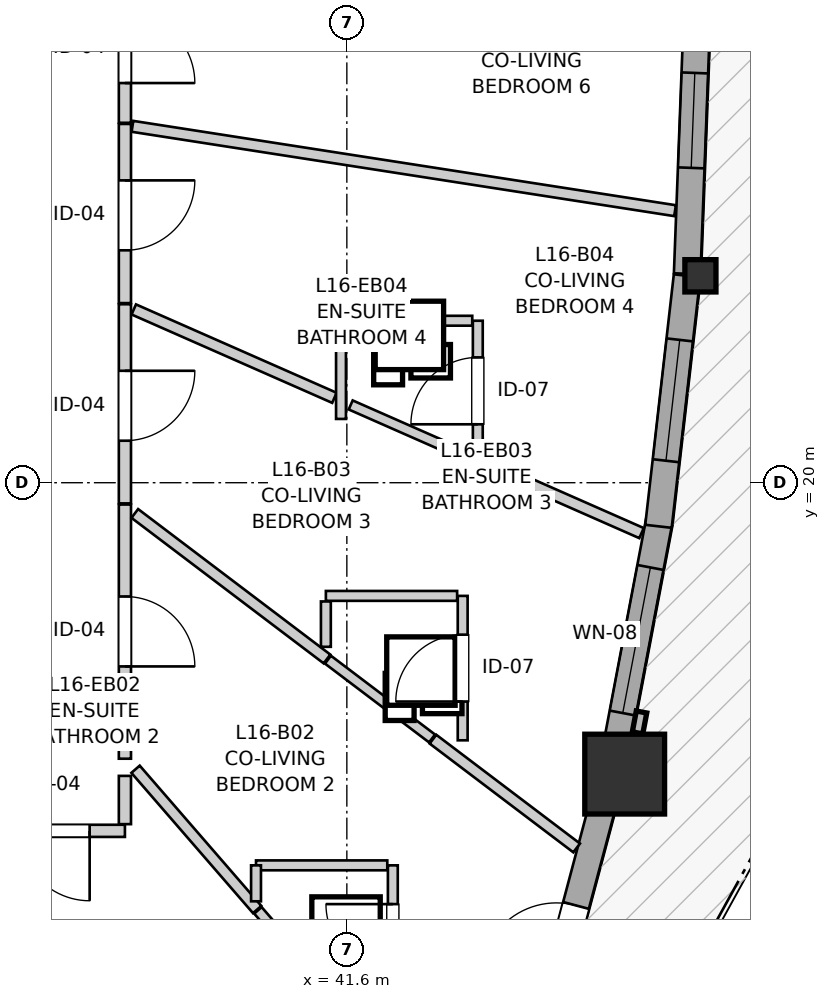
"""IFC4 building model, lengths in metres.
Left out: names, types, materials, properties, quantities, classifications, styles, units other than length and angle.
Written with IfcOpenShell. Run it as: python <this file> out.ifc"""

import sys

from ifc_helpers import new_model, si_unit, direction, frame, frame_2d, origin, origin_2d, place, context, subcontext, project, spatial, rectangle, i_section, extrude, source, transform, mapped, element, fill, save


model = new_model("IFC4")
c1 = context("Model", 3, precision=1e-05, world=origin(), true_north=direction((0.0, 1.0)))
c2 = subcontext(c1, "Body", "Model", "MODEL_VIEW")
j1 = project(units=[si_unit("LENGTHUNIT", "METRE"), si_unit("PLANEANGLEUNIT", "RADIAN")], contexts=[c1])
p1 = place(None, origin())
s1 = spatial("IfcSite", under=j1, at=p1, CompositionType="ELEMENT")
p2 = place(p1, origin())
s2 = spatial("IfcBuilding", under=s1, at=p2, CompositionType="ELEMENT")
p3 = place(p2, frame((0.0, 0.0, 55.8)))
s3 = spatial("IfcBuildingStorey", under=s2, at=p3, CompositionType="ELEMENT", Elevation=55.8)
m1 = source(origin(), c2, "Body", "SweptSolid", [
    extrude(rectangle(XDim=1.05, YDim=1.05, at=origin_2d()), origin(), (0.0, 0.0, 1.0), 2.94),
])
p4 = place(p3, frame((45.256, 16.166, 0.0), z_axis=(0.0, 0.0, 1.0), x_axis=(1.0, 0.0, 0.0)))
e1 = element("IfcColumn", 1, at=p4, inside=s3, PredefinedType="COLUMN", context=c2, shape_type="MappedRepresentation", body=[
    mapped(m1, transform((0.0, 0.0, 0.0), x_axis=(1.0, 0.0, 0.0), y_axis=(0.0, 1.0, 0.0), z_axis=(0.0, 0.0, 1.0), scale=1.0)),
])
m2 = source(origin(), c2, "Body", "SweptSolid", [
    extrude(i_section(OverallWidth=0.409, OverallDepth=0.425, WebThickness=0.03, FlangeThickness=0.048, FilletRadius=0.015, at=origin_2d()), origin(), (0.0, 0.0, 1.0), 2.94),
])
p5 = place(p3, frame((46.252, 22.722, 0.0), z_axis=(0.0, 0.0, 1.0), x_axis=(1.0, 0.0, 0.0)))
e2 = element("IfcColumn", 2, at=p5, inside=s3, PredefinedType="PILASTER", context=c2, shape_type="MappedRepresentation", body=[
    mapped(m2, transform((0.0, 0.0, 0.0), x_axis=(1.0, 0.0, 0.0), y_axis=(0.0, 1.0, 0.0), z_axis=(0.0, 0.0, 1.0), scale=1.0)),
])
p6 = place(p3, frame((44.205, 12.897, 0.0), z_axis=(0.0, 0.0, 1.0), x_axis=(0.257099428233, 0.966384956424, 0.0)))
e3 = element("IfcWall", 3, at=p6, inside=s3, PredefinedType="SOLIDWALL", context=c2, shape_type="SweptSolid", body=[
    extrude(rectangle(XDim=3.13, YDim=0.35, at=frame_2d((1.565, 0.0))), origin(), (0.0, 0.0, 1.0), 2.42),
])
p7 = place(p6, frame((0.595, 0.0, 0.0)))
e4 = element("IfcOpeningElement", 4, at=p7, cuts=e3, PredefinedType="OPENING", context=c2, shape_type="SweptSolid", body=[
    extrude(rectangle(XDim=1.0, YDim=2.1, at=frame_2d((0.5, 1.05))), frame((0.0, 0.185, 0.0), z_axis=(0.0, -1.0, 0.0), x_axis=(1.0, 0.0, 0.0)), (0.0, 0.0, 1.0), 0.37),
])
p8 = place(p3, frame((45.14, 16.494, 0.0), z_axis=(0.0, 0.0, 1.0), x_axis=(0.186608529586, 0.982434352354, 0.0)))
e5 = element("IfcWall", 5, at=p8, inside=s3, PredefinedType="SOLIDWALL", context=c2, shape_type="SweptSolid", body=[
    extrude(rectangle(XDim=3.074, YDim=0.35, at=frame_2d((1.537, 0.0))), origin(), (0.0, 0.0, 1.0), 2.42),
])
p9 = place(p8, frame((0.484, 0.0, 0.82)))
e6 = element("IfcOpeningElement", 6, at=p9, cuts=e5, PredefinedType="OPENING", context=c2, shape_type="SweptSolid", body=[
    extrude(rectangle(XDim=1.95, YDim=1.4, at=frame_2d((0.975, 0.7))), frame((0.0, 0.185, 0.0), z_axis=(0.0, -1.0, 0.0), x_axis=(1.0, 0.0, 0.0)), (0.0, 0.0, 1.0), 0.37),
])
p10 = place(p3, frame((45.7, 19.426, 0.0), z_axis=(0.0, 0.0, 1.0), x_axis=(0.113266370988, 0.993564657787, 0.0)))
e7 = element("IfcWall", 7, at=p10, inside=s3, PredefinedType="SOLIDWALL", context=c2, shape_type="SweptSolid", body=[
    extrude(rectangle(XDim=3.317, YDim=0.35, at=frame_2d((1.659, 0.0))), origin(), (0.0, 0.0, 1.0), 2.42),
])
p11 = place(p10, frame((0.869, 0.0, 0.82)))
e8 = element("IfcOpeningElement", 8, at=p11, cuts=e7, PredefinedType="OPENING", context=c2, shape_type="SweptSolid", body=[
    extrude(rectangle(XDim=1.6, YDim=1.35, at=frame_2d((0.8, 0.675))), frame((0.0, 0.185, 0.0), z_axis=(0.0, -1.0, 0.0), x_axis=(1.0, 0.0, 0.0)), (0.0, 0.0, 1.0), 0.37),
])
p12 = place(p3, frame((46.078, 22.749, 0.0), z_axis=(0.0, 0.0, 1.0), x_axis=(0.037972593677, 0.999278780986, 0.0)))
e9 = element("IfcWall", 9, at=p12, inside=s3, PredefinedType="SOLIDWALL", context=c2, shape_type="SweptSolid", body=[
    extrude(rectangle(XDim=3.298, YDim=0.35, at=frame_2d((1.649, 0.0))), origin(), (0.0, 0.0, 1.0), 2.42),
])
p13 = place(p12, frame((1.394, 0.0, 0.82)))
e10 = element("IfcOpeningElement", 10, at=p13, cuts=e9, PredefinedType="OPENING", context=c2, shape_type="SweptSolid", body=[
    extrude(rectangle(XDim=1.25, YDim=1.35, at=frame_2d((0.625, 0.675))), frame((0.0, 0.185, 0.0), z_axis=(0.0, -1.0, 0.0), x_axis=(1.0, 0.0, 0.0)), (0.0, 0.0, 1.0), 0.37),
])
p14 = place(p3, frame((38.68, 19.713, 0.0), z_axis=(0.0, 0.0, 1.0), x_axis=(0.0, -1.0, 0.0)))
e11 = element("IfcWall", 11, at=p14, inside=s3, PredefinedType="PARTITIONING", context=c2, shape_type="SweptSolid", body=[
    extrude(rectangle(XDim=3.344, YDim=0.16, at=frame_2d((1.672, 0.0))), origin(), (0.0, 0.0, 1.0), 2.94),
])
p15 = place(p14, frame((1.21, 0.0, 0.0)))
e12 = element("IfcOpeningElement", 12, at=p15, cuts=e11, PredefinedType="OPENING", context=c2, shape_type="SweptSolid", body=[
    extrude(rectangle(XDim=0.92, YDim=2.1, at=frame_2d((0.46, 1.05))), frame((0.0, 0.09, 0.0), z_axis=(0.0, -1.0, 0.0), x_axis=(1.0, 0.0, 0.0)), (0.0, 0.0, 1.0), 0.18),
])
p16 = place(p3, frame((38.68, 22.348, 0.0), z_axis=(0.0, 0.0, 1.0), x_axis=(0.0, -1.0, 0.0)))
e13 = element("IfcWall", 13, at=p16, inside=s3, PredefinedType="PARTITIONING", context=c2, shape_type="SweptSolid", body=[
    extrude(rectangle(XDim=2.62, YDim=0.16, at=frame_2d((1.31, 0.0))), origin(), (0.0, 0.0, 1.0), 2.94),
])
p17 = place(p16, frame((0.875, 0.0, 0.0)))
e14 = element("IfcOpeningElement", 14, at=p17, cuts=e13, PredefinedType="OPENING", context=c2, shape_type="SweptSolid", body=[
    extrude(rectangle(XDim=0.92, YDim=2.1, at=frame_2d((0.46, 1.05))), frame((0.0, 0.09, 0.0), z_axis=(0.0, -1.0, 0.0), x_axis=(1.0, 0.0, 0.0)), (0.0, 0.0, 1.0), 0.18),
])
p18 = place(p3, frame((38.68, 24.72, 0.0), z_axis=(0.0, 0.0, 1.0), x_axis=(0.0, -1.0, 0.0)))
e15 = element("IfcWall", 15, at=p18, inside=s3, PredefinedType="PARTITIONING", context=c2, shape_type="SweptSolid", body=[
    extrude(rectangle(XDim=2.357, YDim=0.16, at=frame_2d((1.178, 0.0))), origin(), (0.0, 0.0, 1.0), 2.94),
])
p19 = place(p18, frame((0.742, 0.0, 0.0)))
e16 = element("IfcOpeningElement", 16, at=p19, cuts=e15, PredefinedType="OPENING", context=c2, shape_type="SweptSolid", body=[
    extrude(rectangle(XDim=0.92, YDim=2.1, at=frame_2d((0.46, 1.05))), frame((0.0, 0.09, 0.0), z_axis=(0.0, -1.0, 0.0), x_axis=(1.0, 0.0, 0.0)), (0.0, 0.0, 1.0), 0.18),
])
p20 = place(p3, frame((38.68, 26.702, 0.0), z_axis=(0.0, 0.0, 1.0), x_axis=(0.0, -1.0, 0.0)))
e17 = element("IfcWall", 17, at=p20, inside=s3, PredefinedType="PARTITIONING", context=c2, shape_type="SweptSolid", body=[
    extrude(rectangle(XDim=1.967, YDim=0.16, at=frame_2d((0.983, 0.0))), origin(), (0.0, 0.0, 1.0), 2.94),
])
p21 = place(p20, frame((0.524, 0.0, 0.0)))
e18 = element("IfcOpeningElement", 18, at=p21, cuts=e17, PredefinedType="OPENING", context=c2, shape_type="SweptSolid", body=[
    extrude(rectangle(XDim=0.92, YDim=2.1, at=frame_2d((0.46, 1.05))), frame((0.0, 0.09, 0.0), z_axis=(0.0, -1.0, 0.0), x_axis=(1.0, 0.0, 0.0)), (0.0, 0.0, 1.0), 0.18),
])
p22 = place(p3, frame((42.205, 13.066, 0.0), z_axis=(0.0, 0.0, 1.0), x_axis=(0.0, 1.0, 0.0)))
e19 = element("IfcWall", 19, at=p22, inside=s3, PredefinedType="PARTITIONING", context=c2, shape_type="SweptSolid", body=[
    extrude(rectangle(XDim=1.9, YDim=0.13, at=frame_2d((0.95, 0.0))), origin(), (0.0, 0.0, 1.0), 2.94),
])
p23 = place(p22, frame((0.51, 0.0, 0.0)))
e20 = element("IfcOpeningElement", 20, at=p23, cuts=e19, PredefinedType="OPENING", context=c2, shape_type="SweptSolid", body=[
    extrude(rectangle(XDim=0.88, YDim=2.05, at=frame_2d((0.44, 1.025))), frame((0.0, 0.075, 0.0), z_axis=(0.0, -1.0, 0.0), x_axis=(1.0, 0.0, 0.0)), (0.0, 0.0, 1.0), 0.15),
])
p24 = place(p3, frame((43.124, 16.611, 0.0), z_axis=(0.0, 0.0, 1.0), x_axis=(0.0, 1.0, 0.0)))
e21 = element("IfcWall", 21, at=p24, inside=s3, PredefinedType="PARTITIONING", context=c2, shape_type="SweptSolid", body=[
    extrude(rectangle(XDim=1.9, YDim=0.13, at=frame_2d((0.95, 0.0))), origin(), (0.0, 0.0, 1.0), 2.94),
])
p25 = place(p24, frame((0.51, 0.0, 0.0)))
e22 = element("IfcOpeningElement", 22, at=p25, cuts=e21, PredefinedType="OPENING", context=c2, shape_type="SweptSolid", body=[
    extrude(rectangle(XDim=0.88, YDim=2.05, at=frame_2d((0.44, 1.025))), frame((0.0, 0.075, 0.0), z_axis=(0.0, -1.0, 0.0), x_axis=(1.0, 0.0, 0.0)), (0.0, 0.0, 1.0), 0.15),
])
p26 = place(p3, frame((43.323, 20.286, 0.0), z_axis=(0.0, 0.0, 1.0), x_axis=(0.0, 1.0, 0.0)))
e23 = element("IfcWall", 23, at=p26, inside=s3, PredefinedType="PARTITIONING", context=c2, shape_type="SweptSolid", body=[
    extrude(rectangle(XDim=1.845, YDim=0.13, at=frame_2d((0.923, 0.0))), origin(), (0.0, 0.0, 1.0), 2.94),
])
p27 = place(p26, frame((0.482, 0.0, 0.0)))
e24 = element("IfcOpeningElement", 24, at=p27, cuts=e23, PredefinedType="OPENING", context=c2, shape_type="SweptSolid", body=[
    extrude(rectangle(XDim=0.88, YDim=2.05, at=frame_2d((0.44, 1.025))), frame((0.0, 0.075, 0.0), z_axis=(0.0, -1.0, 0.0), x_axis=(1.0, 0.0, 0.0)), (0.0, 0.0, 1.0), 0.15),
])
p28 = place(p3, frame((38.68, 15.42, 0.0), z_axis=(0.0, 0.0, 1.0), x_axis=(-1.0, 0.0, 0.0)))
e25 = element("IfcWall", 25, at=p28, inside=s3, PredefinedType="PARTITIONING", context=c2, shape_type="SweptSolid", body=[
    extrude(rectangle(XDim=1.816, YDim=0.16, at=frame_2d((0.908, 0.0))), origin(), (0.0, 0.0, 1.0), 2.94),
])
p29 = place(p28, frame((0.464, 0.0, 0.0)))
e26 = element("IfcOpeningElement", 26, at=p29, cuts=e25, PredefinedType="OPENING", context=c2, shape_type="SweptSolid", body=[
    extrude(rectangle(XDim=0.92, YDim=2.1, at=frame_2d((0.46, 1.05))), frame((0.0, 0.09, 0.0), z_axis=(0.0, -1.0, 0.0), x_axis=(1.0, 0.0, 0.0)), (0.0, 0.0, 1.0), 0.18),
])
p30 = place(p3, frame((36.908, 15.295, 0.0), z_axis=(0.0, 0.0, 1.0), x_axis=(0.522407183079, -0.852696156358, 0.0)))
e27 = element("IfcWall", 27, at=p30, inside=s3, PredefinedType="PARTITIONING", context=c2, shape_type="SweptSolid", body=[
    extrude(rectangle(XDim=9.87, YDim=0.145, at=frame_2d((4.935, 0.0))), origin(), (0.0, 0.0, 1.0), 2.94),
])
p31 = place(p3, frame((38.779, 24.689, 0.0), z_axis=(0.0, 0.0, 1.0), x_axis=(0.988134938683, -0.153588225311, 0.0)))
e28 = element("IfcWall", 28, at=p31, inside=s3, PredefinedType="PARTITIONING", context=c2, shape_type="SweptSolid", body=[
    extrude(rectangle(XDim=7.225, YDim=0.145, at=frame_2d((3.612, 0.0))), origin(), (0.0, 0.0, 1.0), 2.94),
])
p32 = place(p3, frame((38.81, 19.595, 0.0), z_axis=(0.0, 0.0, 1.0), x_axis=(0.797304275437, -0.603577577756, 0.0)))
e29 = element("IfcWall", 29, at=p32, inside=s3, PredefinedType="PARTITIONING", context=c2, shape_type="SweptSolid", body=[
    extrude(rectangle(XDim=3.172, YDim=0.145, at=frame_2d((1.586, 0.0))), origin(), (0.0, 0.0, 1.0), 2.94),
])
p33 = place(p3, frame((38.796, 22.28, 0.0), z_axis=(0.0, 0.0, 1.0), x_axis=(0.9151327572, -0.403152622092, 0.0)))
e30 = element("IfcWall", 30, at=p33, inside=s3, PredefinedType="PARTITIONING", context=c2, shape_type="SweptSolid", body=[
    extrude(rectangle(XDim=2.885, YDim=0.145, at=frame_2d((1.442, 0.0))), origin(), (0.0, 0.0, 1.0), 2.94),
])
p34 = place(p3, frame((38.82, 16.23, 0.0), z_axis=(0.0, 0.0, 1.0), x_axis=(0.655037088123, -0.755596726556, 0.0)))
e31 = element("IfcWall", 31, at=p34, inside=s3, PredefinedType="PARTITIONING", context=c2, shape_type="SweptSolid", body=[
    extrude(rectangle(XDim=2.442, YDim=0.145, at=frame_2d((1.221, 0.0))), origin(), (0.0, 0.0, 1.0), 2.94),
])
p35 = place(p3, frame((43.41, 20.248, 0.0), z_axis=(0.0, 0.0, 1.0), x_axis=(0.915032786041, -0.403379474527, 0.0)))
e32 = element("IfcWall", 32, at=p35, inside=s3, PredefinedType="PARTITIONING", context=c2, shape_type="SweptSolid", body=[
    extrude(rectangle(XDim=2.259, YDim=0.145, at=frame_2d((1.13, 0.0))), origin(), (0.0, 0.0, 1.0), 2.94),
])
p36 = place(p3, frame((42.733, 16.626, 0.0), z_axis=(0.0, 0.0, 1.0), x_axis=(0.797372907097, -0.603486907089, 0.0)))
e33 = element("IfcWall", 33, at=p36, inside=s3, PredefinedType="PARTITIONING", context=c2, shape_type="SweptSolid", body=[
    extrude(rectangle(XDim=2.371, YDim=0.145, at=frame_2d((1.186, 0.0))), origin(), (0.0, 0.0, 1.0), 2.94),
])
p37 = place(p3, frame((41.65, 21.023, 0.0), z_axis=(0.0, 0.0, 1.0), x_axis=(0.915165742406, -0.403077739309, 0.0)))
e34 = element("IfcWall", 34, at=p37, inside=s3, PredefinedType="PARTITIONING", context=c2, shape_type="SweptSolid", body=[
    extrude(rectangle(XDim=1.689, YDim=0.13, at=frame_2d((0.844, 0.0))), origin(), (0.0, 0.0, 1.0), 2.94),
])
for number, where, z_axis, x_axis in (
    (35, (41.324, 18.511, 0.0), (0.0, 0.0, 1.0), (1.0, 0.0, 0.0)),
    (36, (40.405, 14.966, 0.0), (0.0, 0.0, 1.0), (1.0, 0.0, 0.0)),
):
    element("IfcWall", number, at=place(p3, frame(where, z_axis=z_axis, x_axis=x_axis)), inside=s3, PredefinedType="PARTITIONING", context=c2, shape_type="SweptSolid", body=[
        extrude(rectangle(XDim=1.727, YDim=0.13, at=frame_2d((0.864, 0.0))), origin(), (0.0, 0.0, 1.0), 2.94),
    ])
p38 = place(p3, frame((41.596, 22.131, 0.0), z_axis=(0.0, 0.0, 1.0), x_axis=(1.0, 0.0, 0.0)))
e37 = element("IfcWall", 37, at=p38, inside=s3, PredefinedType="PARTITIONING", context=c2, shape_type="SweptSolid", body=[
    extrude(rectangle(XDim=1.654, YDim=0.13, at=frame_2d((0.827, 0.0))), origin(), (0.0, 0.0, 1.0), 2.94),
])
p39 = place(p3, frame((40.43, 14.374, 0.0), z_axis=(0.0, 0.0, 1.0), x_axis=(0.655121637619, -0.755523421162, 0.0)))
e38 = element("IfcWall", 38, at=p39, inside=s3, PredefinedType="PARTITIONING", context=c2, shape_type="SweptSolid", body=[
    extrude(rectangle(XDim=1.751, YDim=0.13, at=frame_2d((0.875, 0.0))), origin(), (0.0, 0.0, 1.0), 2.94),
])
p40 = place(p3, frame((41.351, 17.672, 0.0), z_axis=(0.0, 0.0, 1.0), x_axis=(0.797400841938, -0.603449995672, 0.0)))
e39 = element("IfcWall", 39, at=p40, inside=s3, PredefinedType="PARTITIONING", context=c2, shape_type="SweptSolid", body=[
    extrude(rectangle(XDim=1.718, YDim=0.13, at=frame_2d((0.859, 0.0))), origin(), (0.0, 0.0, 1.0), 2.94),
])
p41 = place(p3, frame((41.523, 20.839, 0.0), z_axis=(0.0, 0.0, 1.0), x_axis=(0.0, 1.0, 0.0)))
e40 = element("IfcWall", 40, at=p41, inside=s3, PredefinedType="PARTITIONING", context=c2, shape_type="SweptSolid", body=[
    extrude(rectangle(XDim=1.532, YDim=0.13, at=frame_2d((0.766, 0.0))), origin(), (0.0, 0.0, 1.0), 2.94),
])
p42 = place(p3, frame((38.68, 15.508, 0.0), z_axis=(0.0, 0.0, 1.0), x_axis=(0.0, 1.0, 0.0)))
e41 = element("IfcWall", 41, at=p42, inside=s3, PredefinedType="PARTITIONING", context=c2, shape_type="SweptSolid", body=[
    extrude(rectangle(XDim=0.635, YDim=0.16, at=frame_2d((0.317, 0.0))), origin(), (0.0, 0.0, 1.0), 2.94),
])
p43 = place(p3, frame((41.324, 17.841, 0.0), z_axis=(0.0, 0.0, 1.0), x_axis=(0.0, 1.0, 0.0)))
e42 = element("IfcWall", 42, at=p43, inside=s3, PredefinedType="PARTITIONING", context=c2, shape_type="SweptSolid", body=[
    extrude(rectangle(XDim=0.597, YDim=0.13, at=frame_2d((0.298, 0.0))), origin(), (0.0, 0.0, 1.0), 2.94),
])
p44 = place(p3, frame((40.405, 14.493, 0.0), z_axis=(0.0, 0.0, 1.0), x_axis=(0.0, 1.0, 0.0)))
e43 = element("IfcWall", 43, at=p44, inside=s3, PredefinedType="PARTITIONING", context=c2, shape_type="SweptSolid", body=[
    extrude(rectangle(XDim=0.473, YDim=0.13, at=frame_2d((0.237, 0.0))), origin(), (0.0, 0.0, 1.0), 2.94),
])
m3 = source(origin(), c2, "Body", "SweptSolid", [
    extrude(rectangle(XDim=1.95, YDim=1.4, at=frame_2d((0.975, 0.7))), frame((0.0, 0.03, 0.0), z_axis=(0.0, -1.0, 0.0), x_axis=(1.0, 0.0, 0.0)), (0.0, 0.0, 1.0), 0.06),
])
p45 = place(p9, origin())
e44 = element("IfcWindow", 44, at=p45, inside=s3, PartitioningType="SINGLE_PANEL", PredefinedType="WINDOW", context=c2, shape_type="MappedRepresentation", body=[
    mapped(m3, transform((0.0, 0.0, 0.0), x_axis=(1.0, 0.0, 0.0), y_axis=(0.0, 1.0, 0.0), z_axis=(0.0, 0.0, 1.0), scale=1.0)),
])
fill(e6, e44)
m4 = source(origin(), c2, "Body", "SweptSolid", [
    extrude(rectangle(XDim=1.6, YDim=1.35, at=frame_2d((0.8, 0.675))), frame((0.0, 0.03, 0.0), z_axis=(0.0, -1.0, 0.0), x_axis=(1.0, 0.0, 0.0)), (0.0, 0.0, 1.0), 0.06),
])
p46 = place(p11, origin())
e45 = element("IfcWindow", 45, at=p46, inside=s3, PartitioningType="SINGLE_PANEL", PredefinedType="WINDOW", context=c2, shape_type="MappedRepresentation", body=[
    mapped(m4, transform((0.0, 0.0, 0.0), x_axis=(1.0, 0.0, 0.0), y_axis=(0.0, 1.0, 0.0), z_axis=(0.0, 0.0, 1.0), scale=1.0)),
])
fill(e8, e45)
m5 = source(origin(), c2, "Body", "SweptSolid", [
    extrude(rectangle(XDim=1.25, YDim=1.35, at=frame_2d((0.625, 0.675))), frame((0.0, 0.03, 0.0), z_axis=(0.0, -1.0, 0.0), x_axis=(1.0, 0.0, 0.0)), (0.0, 0.0, 1.0), 0.06),
])
p47 = place(p13, origin())
e46 = element("IfcWindow", 46, at=p47, inside=s3, PartitioningType="SINGLE_PANEL", PredefinedType="WINDOW", context=c2, shape_type="MappedRepresentation", body=[
    mapped(m5, transform((0.0, 0.0, 0.0), x_axis=(1.0, 0.0, 0.0), y_axis=(0.0, 1.0, 0.0), z_axis=(0.0, 0.0, 1.0), scale=1.0)),
])
fill(e10, e46)
m6 = source(origin(), c2, "Body", "SweptSolid", [
    extrude(rectangle(XDim=1.0, YDim=2.1, at=frame_2d((0.5, 1.05))), frame((0.0, 0.025, 0.0), z_axis=(0.0, -1.0, 0.0), x_axis=(1.0, 0.0, 0.0)), (0.0, 0.0, 1.0), 0.05),
])
p48 = place(p7, origin())
e47 = element("IfcDoor", 47, at=p48, inside=s3, OperationType="SINGLE_SWING_LEFT", PredefinedType="DOOR", context=c2, shape_type="MappedRepresentation", body=[
    mapped(m6, transform((0.0, 0.0, 0.0), x_axis=(1.0, 0.0, 0.0), y_axis=(0.0, 1.0, 0.0), z_axis=(0.0, 0.0, 1.0), scale=1.0)),
])
fill(e4, e47)
m7 = source(origin(), c2, "Body", "SweptSolid", [
    extrude(rectangle(XDim=0.92, YDim=2.1, at=frame_2d((0.46, 1.05))), frame((0.0, 0.025, 0.0), z_axis=(0.0, -1.0, 0.0), x_axis=(1.0, 0.0, 0.0)), (0.0, 0.0, 1.0), 0.05),
])
p49 = place(p15, origin())
e48 = element("IfcDoor", 48, at=p49, inside=s3, OperationType="SINGLE_SWING_RIGHT", PredefinedType="DOOR", context=c2, shape_type="MappedRepresentation", body=[
    mapped(m7, transform((0.0, 0.0, 0.0), x_axis=(1.0, 0.0, 0.0), y_axis=(0.0, 1.0, 0.0), z_axis=(0.0, 0.0, 1.0), scale=1.0)),
])
fill(e12, e48)
p50 = place(p17, origin())
e49 = element("IfcDoor", 49, at=p50, inside=s3, OperationType="SINGLE_SWING_LEFT", PredefinedType="DOOR", context=c2, shape_type="MappedRepresentation", body=[
    mapped(m7, transform((0.0, 0.0, 0.0), x_axis=(1.0, 0.0, 0.0), y_axis=(0.0, 1.0, 0.0), z_axis=(0.0, 0.0, 1.0), scale=1.0)),
])
fill(e14, e49)
p51 = place(p19, origin())
e50 = element("IfcDoor", 50, at=p51, inside=s3, OperationType="SINGLE_SWING_LEFT", PredefinedType="DOOR", context=c2, shape_type="MappedRepresentation", body=[
    mapped(m7, transform((0.0, 0.0, 0.0), x_axis=(1.0, 0.0, 0.0), y_axis=(0.0, 1.0, 0.0), z_axis=(0.0, 0.0, 1.0), scale=1.0)),
])
fill(e16, e50)
p52 = place(p21, origin())
e51 = element("IfcDoor", 51, at=p52, inside=s3, OperationType="SINGLE_SWING_RIGHT", PredefinedType="DOOR", context=c2, shape_type="MappedRepresentation", body=[
    mapped(m7, transform((0.0, 0.0, 0.0), x_axis=(1.0, 0.0, 0.0), y_axis=(0.0, 1.0, 0.0), z_axis=(0.0, 0.0, 1.0), scale=1.0)),
])
fill(e18, e51)
m8 = source(origin(), c2, "Body", "SweptSolid", [
    extrude(rectangle(XDim=0.88, YDim=2.05, at=frame_2d((0.44, 1.025))), frame((0.0, 0.025, 0.0), z_axis=(0.0, -1.0, 0.0), x_axis=(1.0, 0.0, 0.0)), (0.0, 0.0, 1.0), 0.05),
])
p53 = place(p23, origin())
e52 = element("IfcDoor", 52, at=p53, inside=s3, OperationType="SINGLE_SWING_RIGHT", PredefinedType="DOOR", context=c2, shape_type="MappedRepresentation", body=[
    mapped(m8, transform((0.0, 0.0, 0.0), x_axis=(1.0, 0.0, 0.0), y_axis=(0.0, 1.0, 0.0), z_axis=(0.0, 0.0, 1.0), scale=1.0)),
])
fill(e20, e52)
p54 = place(p25, origin())
e53 = element("IfcDoor", 53, at=p54, inside=s3, OperationType="SINGLE_SWING_LEFT", PredefinedType="DOOR", context=c2, shape_type="MappedRepresentation", body=[
    mapped(m8, transform((0.0, 0.0, 0.0), x_axis=(1.0, 0.0, 0.0), y_axis=(0.0, 1.0, 0.0), z_axis=(0.0, 0.0, 1.0), scale=1.0)),
])
fill(e22, e53)
p55 = place(p27, origin())
e54 = element("IfcDoor", 54, at=p55, inside=s3, OperationType="SINGLE_SWING_LEFT", PredefinedType="DOOR", context=c2, shape_type="MappedRepresentation", body=[
    mapped(m8, transform((0.0, 0.0, 0.0), x_axis=(1.0, 0.0, 0.0), y_axis=(0.0, 1.0, 0.0), z_axis=(0.0, 0.0, 1.0), scale=1.0)),
])
fill(e24, e54)
p56 = place(p29, origin())
e55 = element("IfcDoor", 55, at=p56, inside=s3, OperationType="SINGLE_SWING_LEFT", PredefinedType="DOOR", context=c2, shape_type="MappedRepresentation", body=[
    mapped(m7, transform((0.0, 0.0, 0.0), x_axis=(1.0, 0.0, 0.0), y_axis=(0.0, 1.0, 0.0), z_axis=(0.0, 0.0, 1.0), scale=1.0)),
])
fill(e26, e55)
save(model, sys.argv[1])
